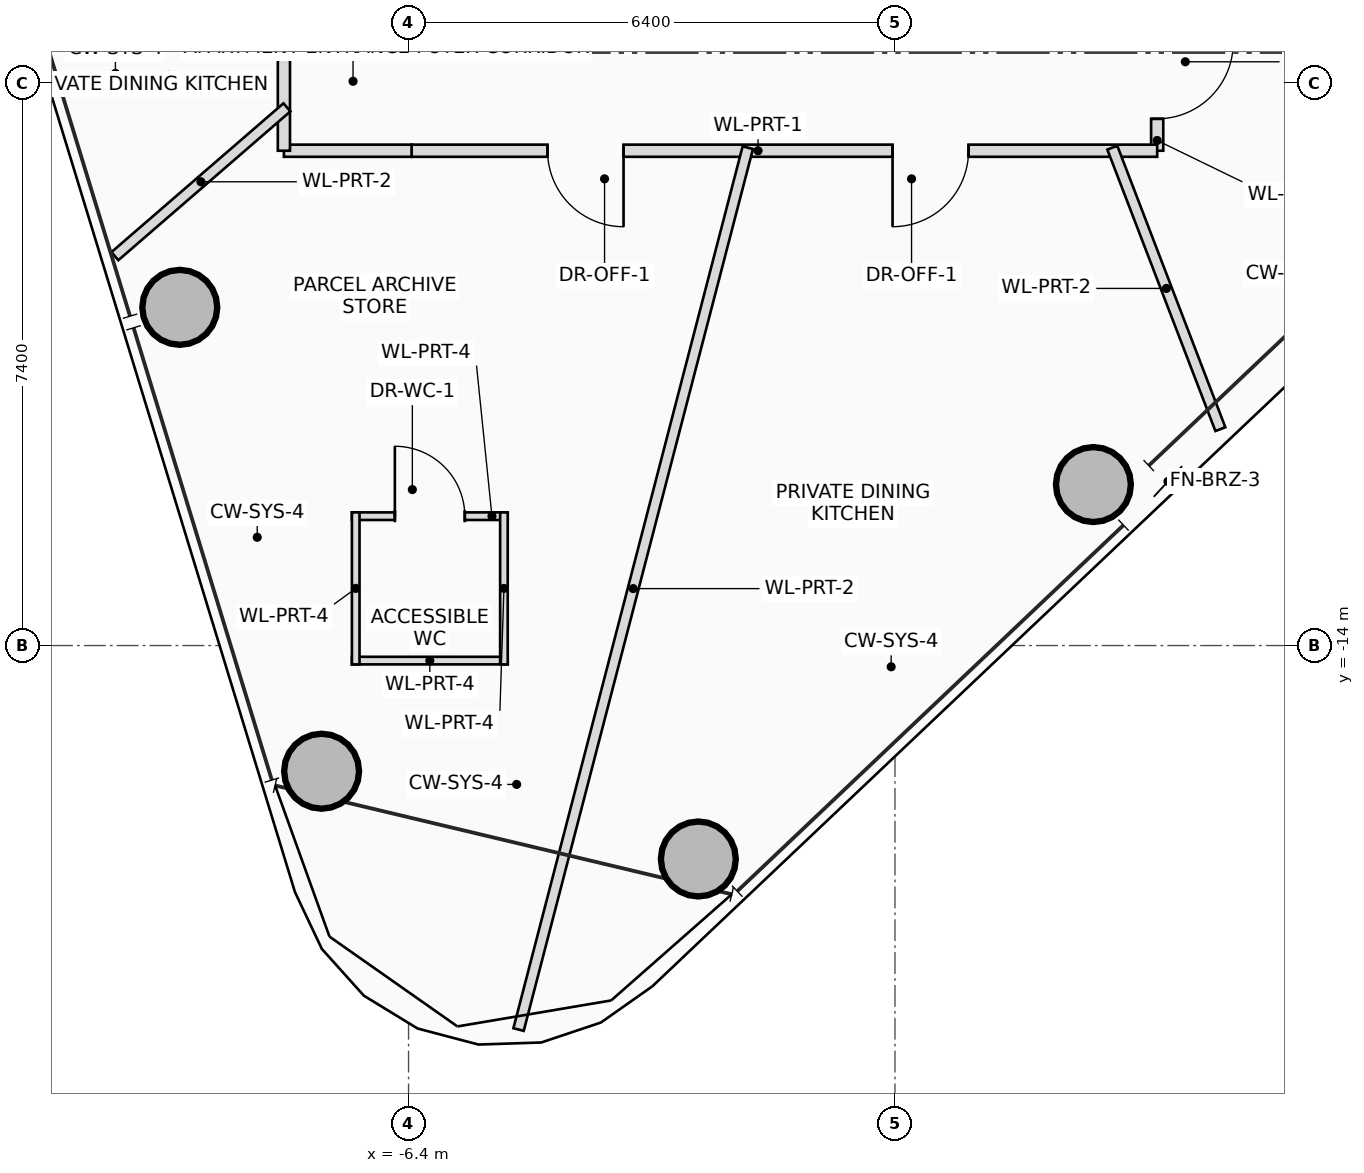
"""IFC4 building model, lengths in metres.
Left out: names, types, materials, properties, quantities, classifications, styles, units other than length and angle.
Written with IfcOpenShell. Run it as: python <this file> out.ifc"""

import sys

from ifc_helpers import new_model, si_unit, direction, frame, frame_2d, origin, origin_2d, place, context, subcontext, project, spatial, rectangle, hollow_circle, extrude, source, transform, mapped, element, fill, save


model = new_model("IFC4")
c1 = context("Model", 3, precision=1e-05, world=origin(), true_north=direction((0.0, 1.0)))
c2 = subcontext(c1, "Body", "Model", "MODEL_VIEW")
j1 = project(units=[si_unit("LENGTHUNIT", "METRE"), si_unit("PLANEANGLEUNIT", "RADIAN")], contexts=[c1])
p1 = place(None, origin())
s1 = spatial("IfcSite", under=j1, at=p1, CompositionType="ELEMENT")
p2 = place(p1, origin())
s2 = spatial("IfcBuilding", under=s1, at=p2, CompositionType="ELEMENT")
p3 = place(p2, frame((0.0, 0.0, 242.25)))
s3 = spatial("IfcBuildingStorey", under=s2, at=p3, CompositionType="ELEMENT", Elevation=242.25)
m1 = source(origin(), c2, "Body", "SweptSolid", [
    extrude(hollow_circle(Radius=0.5, WallThickness=0.04, at=origin_2d()), origin(), (0.0, 0.0, 1.0), 3.4),
])
for number, where, z_axis, x_axis in (
    (1, (-2.587, -16.808, 0.0), (0.0, 0.0, 1.0), (1.0, 0.0, 0.0)),
    (2, (2.611, -11.882, 0.0), (0.0, 0.0, 1.0), (1.0, 0.0, 0.0)),
    (3, (-9.41, -9.55, 0.0), (0.0, 0.0, 1.0), (1.0, 0.0, 0.0)),
    (4, (-7.544, -15.653, 0.0), (0.0, 0.0, 1.0), (1.0, 0.0, 0.0)),
):
    element("IfcColumn", number, at=place(p3, frame(where, z_axis=z_axis, x_axis=x_axis)), inside=s3, PredefinedType="COLUMN", context=c2, shape_type="MappedRepresentation", body=[
        mapped(m1, transform((0.0, 0.0, 0.0), scale=1.0)),
    ])
p4 = place(p3, frame((-7.145, -12.298, 0.0), z_axis=(0.0, 0.0, 1.0), x_axis=(1.0, 0.0, 0.0)))
e5 = element("IfcWall", 5, at=p4, inside=s3, PredefinedType="PARTITIONING", context=c2, shape_type="SweptSolid", body=[
    extrude(rectangle(XDim=2.05, YDim=0.1, at=frame_2d((1.025, 0.0))), origin(), (0.0, 0.0, 1.0), 2.605),
])
p5 = place(p4, frame((0.565, 0.0, 0.0)))
e6 = element("IfcOpeningElement", 6, at=p5, cuts=e5, PredefinedType="OPENING", context=c2, shape_type="SweptSolid", body=[
    extrude(rectangle(XDim=0.92, YDim=2.1, at=frame_2d((0.46, 1.05))), frame((0.0, 0.06, 0.0), z_axis=(0.0, -1.0, 0.0), x_axis=(1.0, 0.0, 0.0)), (0.0, 0.0, 1.0), 0.12),
])
p6 = place(p3, frame((-5.095, -14.198, 0.0), z_axis=(0.0, 0.0, 1.0), x_axis=(-1.0, 0.0, 0.0)))
e7 = element("IfcWall", 7, at=p6, inside=s3, PredefinedType="PARTITIONING", context=c2, shape_type="SweptSolid", body=[
    extrude(rectangle(XDim=2.05, YDim=0.1, at=frame_2d((1.025, 0.0))), origin(), (0.0, 0.0, 1.0), 3.2),
])
p7 = place(p3, frame((-5.145, -12.248, 0.0), z_axis=(0.0, 0.0, 1.0), x_axis=(0.0, -1.0, 0.0)))
e8 = element("IfcWall", 8, at=p7, inside=s3, PredefinedType="PARTITIONING", context=c2, shape_type="SweptSolid", body=[
    extrude(rectangle(XDim=2.0, YDim=0.1, at=frame_2d((1.0, 0.0))), origin(), (0.0, 0.0, 1.0), 2.855),
])
p8 = place(p3, frame((-7.095, -14.248, 0.0), z_axis=(0.0, 0.0, 1.0), x_axis=(0.0, 1.0, 0.0)))
e9 = element("IfcWall", 9, at=p8, inside=s3, PredefinedType="PARTITIONING", context=c2, shape_type="SweptSolid", body=[
    extrude(rectangle(XDim=2.0, YDim=0.1, at=frame_2d((1.0, 0.0))), origin(), (0.0, 0.0, 1.0), 2.605),
])
p9 = place(p3, frame((3.45, -5.85, 0.0), z_axis=(0.0, 0.0, 1.0), x_axis=(0.0, -1.0, 0.0)))
e10 = element("IfcWall", 10, at=p9, inside=s3, PredefinedType="PARTITIONING", context=c2, shape_type="SweptSolid", body=[
    extrude(rectangle(XDim=1.64, YDim=0.16, at=frame_2d((0.82, 0.0))), origin(), (0.0, 0.0, 1.0), 3.2),
])
p10 = place(p9, frame((0.22, 0.0, 0.0)))
e11 = element("IfcOpeningElement", 11, at=p10, cuts=e10, PredefinedType="OPENING", context=c2, shape_type="SweptSolid", body=[
    extrude(rectangle(XDim=1.0, YDim=2.25, at=frame_2d((0.5, 1.125))), frame((0.0, 0.09, 0.0), z_axis=(0.0, -1.0, 0.0), x_axis=(1.0, 0.0, 0.0)), (0.0, 0.0, 1.0), 0.18),
])
p11 = place(p3, frame((3.45, -7.49, 0.0), z_axis=(0.0, 0.0, 1.0), x_axis=(-1.0, 0.0, 0.0)))
e12 = element("IfcWall", 12, at=p11, inside=s3, PredefinedType="PARTITIONING", context=c2, shape_type="SweptSolid", body=[
    extrude(rectangle(XDim=9.81, YDim=0.16, at=frame_2d((4.905, 0.0))), origin(), (0.0, 0.0, 1.0), 2.605),
])
p12 = place(p11, frame((2.482, 0.0, 0.0)))
e13 = element("IfcOpeningElement", 13, at=p12, cuts=e12, PredefinedType="OPENING", context=c2, shape_type="SweptSolid", body=[
    extrude(rectangle(XDim=1.0, YDim=2.25, at=frame_2d((0.5, 1.125))), frame((0.0, 0.09, 0.0), z_axis=(0.0, -1.0, 0.0), x_axis=(1.0, 0.0, 0.0)), (0.0, 0.0, 1.0), 0.18),
])
p13 = place(p11, frame((7.021, 0.0, 0.0)))
e14 = element("IfcOpeningElement", 14, at=p13, cuts=e12, PredefinedType="OPENING", context=c2, shape_type="SweptSolid", body=[
    extrude(rectangle(XDim=1.0, YDim=2.25, at=frame_2d((0.5, 1.125))), frame((0.0, 0.09, 0.0), z_axis=(0.0, -1.0, 0.0), x_axis=(1.0, 0.0, 0.0)), (0.0, 0.0, 1.0), 0.18),
])
p14 = place(p3, frame((-6.36, -7.49, 0.0), z_axis=(0.0, 0.0, 1.0), x_axis=(-1.0, 0.0, 0.0)))
e15 = element("IfcWall", 15, at=p14, inside=s3, PredefinedType="PARTITIONING", context=c2, shape_type="SweptSolid", body=[
    extrude(rectangle(XDim=1.68, YDim=0.16, at=frame_2d((0.84, 0.0))), origin(), (0.0, 0.0, 1.0), 2.605),
])
p15 = place(p3, frame((-8.04, -7.49, 0.0), z_axis=(0.0, 0.0, 1.0), x_axis=(0.0, 1.0, 0.0)))
e16 = element("IfcWall", 16, at=p15, inside=s3, PredefinedType="PARTITIONING", context=c2, shape_type="SweptSolid", body=[
    extrude(rectangle(XDim=1.64, YDim=0.16, at=frame_2d((0.82, 0.0))), origin(), (0.0, 0.0, 1.0), 2.805),
])
p16 = place(p3, frame((-8.0, -6.919, 0.0), z_axis=(0.0, 0.0, 1.0), x_axis=(-0.756358809539, -0.654156977516, 0.0)))
e17 = element("IfcWall", 17, at=p16, inside=s3, PredefinedType="PARTITIONING", context=c2, shape_type="SweptSolid", body=[
    extrude(rectangle(XDim=2.993, YDim=0.14, at=frame_2d((1.497, 0.0))), origin(), (0.0, 0.0, 1.0), 2.765),
])
p17 = place(p3, frame((-1.937, -7.45, 0.0), z_axis=(0.0, 0.0, 1.0), x_axis=(-0.251581963347, -0.967835996292, 0.0)))
e18 = element("IfcWall", 18, at=p17, inside=s3, PredefinedType="PARTITIONING", context=c2, shape_type="SweptSolid", body=[
    extrude(rectangle(XDim=11.988, YDim=0.14, at=frame_2d((5.994, 0.0))), origin(), (0.0, 0.0, 1.0), 2.605),
])
p18 = place(p3, frame((2.86, -7.45, 0.0), z_axis=(0.0, 0.0, 1.0), x_axis=(0.35834382605, -0.933589686282, 0.0)))
e19 = element("IfcWall", 19, at=p18, inside=s3, PredefinedType="PARTITIONING", context=c2, shape_type="SweptSolid", body=[
    extrude(rectangle(XDim=3.967, YDim=0.14, at=frame_2d((1.983, 0.0))), origin(), (0.0, 0.0, 1.0), 2.605),
])
p19 = place(p5, origin())
e20 = element("IfcDoor", 20, at=p19, inside=s3, OperationType="SINGLE_SWING_LEFT", PredefinedType="DOOR", context=c2, shape_type="SweptSolid", body=[
    extrude(rectangle(XDim=0.92, YDim=2.1, at=frame_2d((0.46, 1.05))), frame((0.0, 0.025, 0.0), z_axis=(0.0, -1.0, 0.0), x_axis=(1.0, 0.0, 0.0)), (0.0, 0.0, 1.0), 0.05),
])
fill(e6, e20)
p20 = place(p10, origin())
e21 = element("IfcDoor", 21, at=p20, inside=s3, OperationType="SINGLE_SWING_LEFT", PredefinedType="DOOR", context=c2, shape_type="SweptSolid", body=[
    extrude(rectangle(XDim=1.0, YDim=2.25, at=frame_2d((0.5, 1.125))), frame((0.0, 0.025, 0.0), z_axis=(0.0, -1.0, 0.0), x_axis=(1.0, 0.0, 0.0)), (0.0, 0.0, 1.0), 0.05),
])
fill(e11, e21)
p21 = place(p12, origin())
e22 = element("IfcDoor", 22, at=p21, inside=s3, OperationType="SINGLE_SWING_RIGHT", PredefinedType="DOOR", context=c2, shape_type="SweptSolid", body=[
    extrude(rectangle(XDim=1.0, YDim=2.25, at=frame_2d((0.5, 1.125))), frame((0.0, 0.025, 0.0), z_axis=(0.0, -1.0, 0.0), x_axis=(1.0, 0.0, 0.0)), (0.0, 0.0, 1.0), 0.05),
])
fill(e13, e22)
p22 = place(p13, origin())
e23 = element("IfcDoor", 23, at=p22, inside=s3, OperationType="SINGLE_SWING_LEFT", PredefinedType="DOOR", context=c2, shape_type="SweptSolid", body=[
    extrude(rectangle(XDim=1.0, YDim=2.25, at=frame_2d((0.5, 1.125))), frame((0.0, 0.025, 0.0), z_axis=(0.0, -1.0, 0.0), x_axis=(1.0, 0.0, 0.0)), (0.0, 0.0, 1.0), 0.05),
])
fill(e14, e23)
save(model, sys.argv[1])
